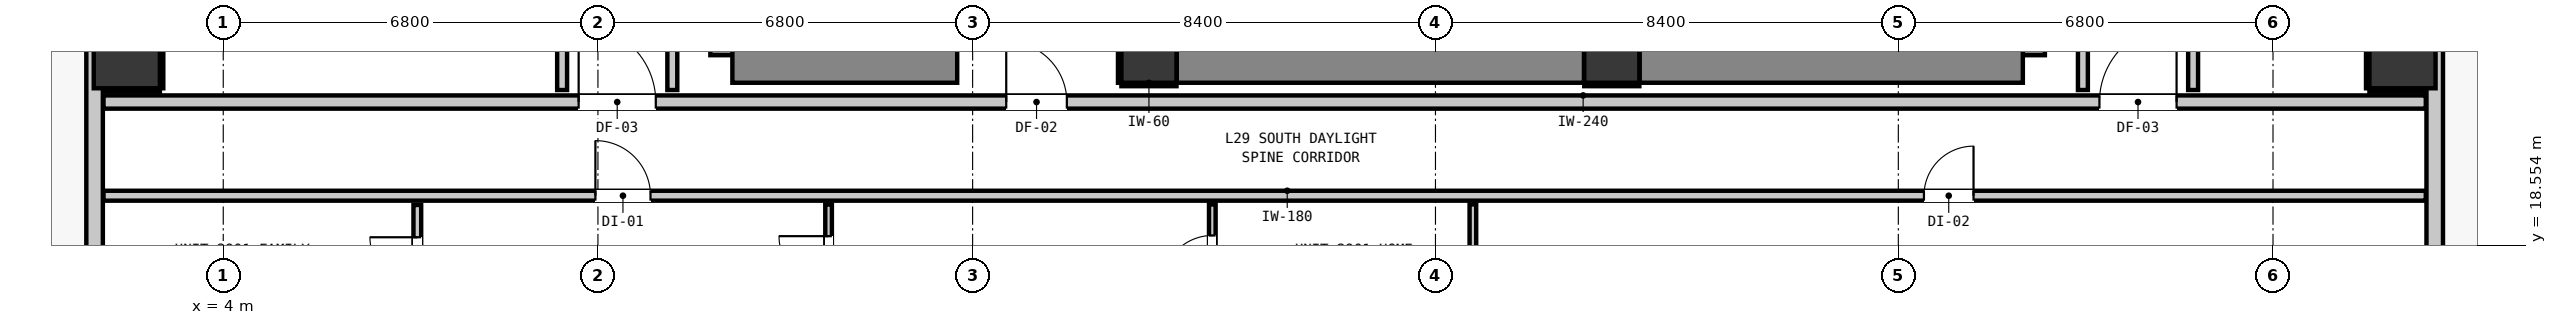
"""IFC4 building model, lengths in metres.
Left out: names, types, materials, properties, quantities, classifications, styles, units other than length and angle.
Written with IfcOpenShell. Run it as: python <this file> out.ifc"""

import sys

from ifc_helpers import new_model, si_unit, direction, frame, frame_2d, origin, origin_2d, place, context, subcontext, project, spatial, rectangle, extrude, element, fill, save


model = new_model("IFC4")
c1 = context("Model", 3, precision=1e-05, world=origin(), true_north=direction((0.0, 1.0)))
c2 = subcontext(c1, "Body", "Model", "MODEL_VIEW")
j1 = project(units=[si_unit("LENGTHUNIT", "METRE"), si_unit("PLANEANGLEUNIT", "RADIAN")], contexts=[c1])
p1 = place(None, origin())
s1 = spatial("IfcSite", under=j1, at=p1, CompositionType="ELEMENT")
p2 = place(p1, origin())
s2 = spatial("IfcBuilding", under=s1, at=p2, CompositionType="ELEMENT")
p3 = place(p2, frame((0.0, 0.0, 102.76)))
s3 = spatial("IfcBuildingStorey", under=s2, at=p3, CompositionType="ELEMENT", Elevation=102.76)
for number, where, z_axis, x_axis in (
    (1, (20.8, 22.0, 0.0), (0.0, 0.0, 1.0), (1.0, 0.0, 0.0)),
    (2, (29.2, 22.0, 0.0), (0.0, 0.0, 1.0), (1.0, 0.0, 0.0)),
):
    element("IfcColumn", number, at=place(p3, frame(where, z_axis=z_axis, x_axis=x_axis)), inside=s3, PredefinedType="COLUMN", context=c2, shape_type="SweptSolid", body=[
        extrude(rectangle(XDim=1.0, YDim=1.0, at=origin_2d()), origin(), (0.0, 0.0, 1.0), 3.32),
    ])
p4 = place(p3, frame((13.34, 22.0, 0.0), z_axis=(0.0, 0.0, 1.0), x_axis=(0.0, 1.0, 0.0)))
e3 = element("IfcWall", 3, at=p4, inside=s3, PredefinedType="SHEAR", context=c2, shape_type="SweptSolid", body=[
    extrude(rectangle(XDim=8.195, YDim=1.0, at=frame_2d((4.098, 0.0))), origin(), (0.0, 0.0, 1.0), 3.32),
])
p5 = place(p3, frame((13.24, 22.0, 0.0), z_axis=(0.0, 0.0, 1.0), x_axis=(1.0, 0.0, 0.0)))
e4 = element("IfcWall", 4, at=p5, inside=s3, PredefinedType="SHEAR", context=c2, shape_type="SweptSolid", body=[
    extrude(rectangle(XDim=4.08, YDim=1.0, at=frame_2d((2.04, 0.0))), origin(), (0.0, 0.0, 1.0), 3.32),
])
p6 = place(p3, frame((36.56, 22.0, 0.0), z_axis=(0.0, 0.0, 1.0), x_axis=(0.0, 1.0, 0.0)))
e5 = element("IfcWall", 5, at=p6, inside=s3, PredefinedType="SHEAR", context=c2, shape_type="SweptSolid", body=[
    extrude(rectangle(XDim=8.195, YDim=1.0, at=frame_2d((4.098, 0.0))), origin(), (0.0, 0.0, 1.0), 3.32),
])
p7 = place(p3, frame((29.705, 22.0, 0.0), z_axis=(0.0, 0.0, 1.0), x_axis=(1.0, 0.0, 0.0)))
e6 = element("IfcWall", 6, at=p7, inside=s3, PredefinedType="SHEAR", context=c2, shape_type="SweptSolid", body=[
    extrude(rectangle(XDim=6.955, YDim=1.0, at=frame_2d((3.478, 0.0))), origin(), (0.0, 0.0, 1.0), 3.32),
])
p8 = place(p3, frame((21.305, 22.0, 0.0), z_axis=(0.0, 0.0, 1.0), x_axis=(1.0, 0.0, 0.0)))
e7 = element("IfcWall", 7, at=p8, inside=s3, PredefinedType="SHEAR", context=c2, shape_type="SweptSolid", body=[
    extrude(rectangle(XDim=7.39, YDim=1.0, at=frame_2d((3.695, 0.0))), origin(), (0.0, 0.0, 1.0), 3.32),
])
for number, where, z_axis, x_axis in (
    (8, (2.25, 22.0, 0.0), (0.0, 0.0, 1.0), (1.0, 0.0, 0.0)),
    (9, (43.55, 22.0, 0.0), (0.0, 0.0, 1.0), (1.0, 0.0, 0.0)),
):
    element("IfcColumn", number, at=place(p3, frame(where, z_axis=z_axis, x_axis=x_axis)), inside=s3, PredefinedType="COLUMN", context=c2, shape_type="SweptSolid", body=[
        extrude(rectangle(XDim=1.2, YDim=1.2, at=origin_2d()), origin(), (0.0, 0.0, 1.0), 2.9),
    ])
p9 = place(p3, frame((1.665, 16.365, 0.0), z_axis=(0.0, 0.0, 1.0), x_axis=(0.0, 1.0, 0.0)))
e10 = element("IfcWall", 10, at=p9, inside=s3, PredefinedType="STANDARD", context=c2, shape_type="SweptSolid", body=[
    extrude(rectangle(XDim=34.67, YDim=0.3, at=frame_2d((17.335, 0.0))), origin(), (0.0, 0.0, 1.0), 2.9),
])
p10 = place(p9, frame((8.955, 0.0, 0.0)))
e11 = element("IfcOpeningElement", 11, at=p10, cuts=e10, PredefinedType="OPENING", context=c2, shape_type="SweptSolid", body=[
    extrude(rectangle(XDim=1.0, YDim=2.15, at=frame_2d((0.5, 1.075))), frame((0.0, 0.16, 0.0), z_axis=(0.0, -1.0, 0.0), x_axis=(1.0, 0.0, 0.0)), (0.0, 0.0, 1.0), 0.32),
])
p11 = place(p9, frame((30.958, 0.0, 0.85)))
e12 = element("IfcOpeningElement", 12, at=p11, cuts=e10, PredefinedType="OPENING", context=c2, shape_type="SweptSolid", body=[
    extrude(rectangle(XDim=1.05, YDim=1.65, at=frame_2d((0.525, 0.825))), frame((0.0, 0.16, 0.0), z_axis=(0.0, -1.0, 0.0), x_axis=(1.0, 0.0, 0.0)), (0.0, 0.0, 1.0), 0.32),
])
p12 = place(p9, frame((10.88, 0.0, 0.85)))
e13 = element("IfcOpeningElement", 13, at=p12, cuts=e10, PredefinedType="OPENING", context=c2, shape_type="SweptSolid", body=[
    extrude(rectangle(XDim=1.05, YDim=1.65, at=frame_2d((0.525, 0.825))), frame((0.0, 0.16, 0.0), z_axis=(0.0, -1.0, 0.0), x_axis=(1.0, 0.0, 0.0)), (0.0, 0.0, 1.0), 0.32),
])
p13 = place(p9, frame((15.41, 0.0, 0.85)))
e14 = element("IfcOpeningElement", 14, at=p13, cuts=e10, PredefinedType="OPENING", context=c2, shape_type="SweptSolid", body=[
    extrude(rectangle(XDim=1.05, YDim=1.65, at=frame_2d((0.525, 0.825))), frame((0.0, 0.16, 0.0), z_axis=(0.0, -1.0, 0.0), x_axis=(1.0, 0.0, 0.0)), (0.0, 0.0, 1.0), 0.32),
])
p14 = place(p3, frame((44.135, 51.035, 0.0), z_axis=(0.0, 0.0, 1.0), x_axis=(0.0, -1.0, 0.0)))
e15 = element("IfcWall", 15, at=p14, inside=s3, PredefinedType="STANDARD", context=c2, shape_type="SweptSolid", body=[
    extrude(rectangle(XDim=34.67, YDim=0.3, at=frame_2d((17.335, 0.0))), origin(), (0.0, 0.0, 1.0), 2.9),
])
p15 = place(p14, frame((0.901, 0.0, 0.0)))
e16 = element("IfcOpeningElement", 16, at=p15, cuts=e15, PredefinedType="OPENING", context=c2, shape_type="SweptSolid", body=[
    extrude(rectangle(XDim=1.0, YDim=2.15, at=frame_2d((0.5, 1.075))), frame((0.0, 0.16, 0.0), z_axis=(0.0, -1.0, 0.0), x_axis=(1.0, 0.0, 0.0)), (0.0, 0.0, 1.0), 0.32),
])
p16 = place(p14, frame((32.608, 0.0, 0.85)))
e17 = element("IfcOpeningElement", 17, at=p16, cuts=e15, PredefinedType="OPENING", context=c2, shape_type="SweptSolid", body=[
    extrude(rectangle(XDim=1.05, YDim=1.65, at=frame_2d((0.525, 0.825))), frame((0.0, 0.16, 0.0), z_axis=(0.0, -1.0, 0.0), x_axis=(1.0, 0.0, 0.0)), (0.0, 0.0, 1.0), 0.32),
])
p17 = place(p14, frame((23.248, 0.0, 0.85)))
e18 = element("IfcOpeningElement", 18, at=p17, cuts=e15, PredefinedType="OPENING", context=c2, shape_type="SweptSolid", body=[
    extrude(rectangle(XDim=1.05, YDim=1.65, at=frame_2d((0.525, 0.825))), frame((0.0, 0.16, 0.0), z_axis=(0.0, -1.0, 0.0), x_axis=(1.0, 0.0, 0.0)), (0.0, 0.0, 1.0), 0.32),
])
p18 = place(p3, frame((1.827, 21.15, 0.0), z_axis=(0.0, 0.0, 1.0), x_axis=(1.0, 0.0, 0.0)))
e19 = element("IfcWall", 19, at=p18, inside=s3, PredefinedType="PARTITIONING", context=c2, shape_type="SweptSolid", body=[
    extrude(rectangle(XDim=42.146, YDim=0.24, at=frame_2d((21.073, 0.0))), origin(), (0.0, 0.0, 1.0), 2.9),
])
p19 = place(p18, frame((16.383, 0.0, 0.0)))
e20 = element("IfcOpeningElement", 20, at=p19, cuts=e19, PredefinedType="OPENING", context=c2, shape_type="SweptSolid", body=[
    extrude(rectangle(XDim=1.1, YDim=2.15, at=frame_2d((0.55, 1.075))), frame((0.0, 0.13, 0.0), z_axis=(0.0, -1.0, 0.0), x_axis=(1.0, 0.0, 0.0)), (0.0, 0.0, 1.0), 0.26),
])
p20 = place(p18, frame((8.623, 0.0, 0.0)))
e21 = element("IfcOpeningElement", 21, at=p20, cuts=e19, PredefinedType="OPENING", context=c2, shape_type="SweptSolid", body=[
    extrude(rectangle(XDim=1.4, YDim=2.15, at=frame_2d((0.7, 1.075))), frame((0.0, 0.13, 0.0), z_axis=(0.0, -1.0, 0.0), x_axis=(1.0, 0.0, 0.0)), (0.0, 0.0, 1.0), 0.26),
])
p21 = place(p18, frame((36.223, 0.0, 0.0)))
e22 = element("IfcOpeningElement", 22, at=p21, cuts=e19, PredefinedType="OPENING", context=c2, shape_type="SweptSolid", body=[
    extrude(rectangle(XDim=1.4, YDim=2.15, at=frame_2d((0.7, 1.075))), frame((0.0, 0.13, 0.0), z_axis=(0.0, -1.0, 0.0), x_axis=(1.0, 0.0, 0.0)), (0.0, 0.0, 1.0), 0.26),
])
p22 = place(p3, frame((1.827, 19.45, 0.0), z_axis=(0.0, 0.0, 1.0), x_axis=(1.0, 0.0, 0.0)))
e23 = element("IfcWall", 23, at=p22, inside=s3, PredefinedType="PARTITIONING", context=c2, shape_type="SweptSolid", body=[
    extrude(rectangle(XDim=42.146, YDim=0.18, at=frame_2d((21.073, 0.0))), origin(), (0.0, 0.0, 1.0), 2.9),
])
p23 = place(p22, frame((8.927, 0.0, 0.0)))
e24 = element("IfcOpeningElement", 24, at=p23, cuts=e23, PredefinedType="OPENING", context=c2, shape_type="SweptSolid", body=[
    extrude(rectangle(XDim=1.0, YDim=2.15, at=frame_2d((0.5, 1.075))), frame((0.0, 0.1, 0.0), z_axis=(0.0, -1.0, 0.0), x_axis=(1.0, 0.0, 0.0)), (0.0, 0.0, 1.0), 0.2),
])
p24 = place(p22, frame((33.038, 0.0, 0.0)))
e25 = element("IfcOpeningElement", 25, at=p24, cuts=e23, PredefinedType="OPENING", context=c2, shape_type="SweptSolid", body=[
    extrude(rectangle(XDim=0.9, YDim=2.1, at=frame_2d((0.45, 1.05))), frame((0.0, 0.1, 0.0), z_axis=(0.0, -1.0, 0.0), x_axis=(1.0, 0.0, 0.0)), (0.0, 0.0, 1.0), 0.2),
])
p25 = place(p3, frame((10.15, 21.368, 0.0), z_axis=(0.0, 0.0, 1.0), x_axis=(0.0, 1.0, 0.0)))
e26 = element("IfcWall", 26, at=p25, inside=s3, PredefinedType="PARTITIONING", context=c2, shape_type="SweptSolid", body=[
    extrude(rectangle(XDim=3.109, YDim=0.18, at=frame_2d((1.555, 0.0))), origin(), (0.0, 0.0, 1.0), 2.9),
])
for number, where, z_axis, x_axis in (
    (27, (12.15, 21.368, 0.0), (0.0, 0.0, 1.0), (0.0, 1.0, 0.0)),
    (28, (37.75, 21.368, 0.0), (0.0, 0.0, 1.0), (0.0, 1.0, 0.0)),
):
    element("IfcWall", number, at=place(p3, frame(where, z_axis=z_axis, x_axis=x_axis)), inside=s3, PredefinedType="PARTITIONING", context=c2, shape_type="SweptSolid", body=[
        extrude(rectangle(XDim=18.694, YDim=0.18, at=frame_2d((9.347, 0.0))), origin(), (0.0, 0.0, 1.0), 2.9),
    ])
p26 = place(p3, frame((39.75, 21.368, 0.0), z_axis=(0.0, 0.0, 1.0), x_axis=(0.0, 1.0, 0.0)))
e29 = element("IfcWall", 29, at=p26, inside=s3, PredefinedType="PARTITIONING", context=c2, shape_type="SweptSolid", body=[
    extrude(rectangle(XDim=3.109, YDim=0.18, at=frame_2d((1.555, 0.0))), origin(), (0.0, 0.0, 1.0), 2.9),
])
p27 = place(p3, frame((7.522, 17.255, 0.0), z_axis=(0.0, 0.0, 1.0), x_axis=(0.0, 1.0, 0.0)))
e30 = element("IfcWall", 30, at=p27, inside=s3, PredefinedType="PARTITIONING", context=c2, shape_type="SweptSolid", body=[
    extrude(rectangle(XDim=2.027, YDim=0.14, at=frame_2d((1.014, 0.0))), origin(), (0.0, 0.0, 1.0), 2.9),
])
p28 = place(p27, frame((0.581, 0.0, 0.0)))
e31 = element("IfcOpeningElement", 31, at=p28, cuts=e30, PredefinedType="OPENING", context=c2, shape_type="SweptSolid", body=[
    extrude(rectangle(XDim=0.86, YDim=2.02, at=frame_2d((0.43, 1.01))), frame((0.0, 0.08, 0.0), z_axis=(0.0, -1.0, 0.0), x_axis=(1.0, 0.0, 0.0)), (0.0, 0.0, 1.0), 0.16),
])
p29 = place(p3, frame((14.986, 17.245, 0.0), z_axis=(0.0, 0.0, 1.0), x_axis=(0.0, 1.0, 0.0)))
e32 = element("IfcWall", 32, at=p29, inside=s3, PredefinedType="PARTITIONING", context=c2, shape_type="SweptSolid", body=[
    extrude(rectangle(XDim=2.047, YDim=0.12, at=frame_2d((1.023, 0.0))), origin(), (0.0, 0.0, 1.0), 2.9),
])
p30 = place(p29, frame((0.571, 0.0, 0.0)))
e33 = element("IfcOpeningElement", 33, at=p30, cuts=e32, PredefinedType="OPENING", context=c2, shape_type="SweptSolid", body=[
    extrude(rectangle(XDim=0.9, YDim=2.1, at=frame_2d((0.45, 1.05))), frame((0.0, 0.07, 0.0), z_axis=(0.0, -1.0, 0.0), x_axis=(1.0, 0.0, 0.0)), (0.0, 0.0, 1.0), 0.14),
])
p31 = place(p3, frame((21.95, 17.245, 0.0), z_axis=(0.0, 0.0, 1.0), x_axis=(0.0, 1.0, 0.0)))
e34 = element("IfcWall", 34, at=p31, inside=s3, PredefinedType="PARTITIONING", context=c2, shape_type="SweptSolid", body=[
    extrude(rectangle(XDim=2.047, YDim=0.12, at=frame_2d((1.023, 0.0))), origin(), (0.0, 0.0, 1.0), 2.9),
])
p32 = place(p31, frame((0.583, 0.0, 0.0)))
e35 = element("IfcOpeningElement", 35, at=p32, cuts=e34, PredefinedType="OPENING", context=c2, shape_type="SweptSolid", body=[
    extrude(rectangle(XDim=0.9, YDim=2.1, at=frame_2d((0.45, 1.05))), frame((0.0, 0.07, 0.0), z_axis=(0.0, -1.0, 0.0), x_axis=(1.0, 0.0, 0.0)), (0.0, 0.0, 1.0), 0.14),
])
p33 = place(p3, frame((26.679, 17.245, 0.0), z_axis=(0.0, 0.0, 1.0), x_axis=(0.0, 1.0, 0.0)))
e36 = element("IfcWall", 36, at=p33, inside=s3, PredefinedType="PARTITIONING", context=c2, shape_type="SweptSolid", body=[
    extrude(rectangle(XDim=2.047, YDim=0.12, at=frame_2d((1.023, 0.0))), origin(), (0.0, 0.0, 1.0), 2.9),
])
for number, where, z_axis, x_axis in (
    (37, (20.3, 21.468, 0.0), (0.0, 0.0, 1.0), (1.0, 0.0, 0.0)),
    (38, (20.268, 21.5, 0.0), (0.0, 0.0, 1.0), (0.0, 1.0, 0.0)),
    (39, (28.7, 21.468, 0.0), (0.0, 0.0, 1.0), (1.0, 0.0, 0.0)),
):
    element("IfcWall", number, at=place(p3, frame(where, z_axis=z_axis, x_axis=x_axis)), inside=s3, PredefinedType="PARTITIONING", context=c2, shape_type="SweptSolid", body=[
        extrude(rectangle(XDim=1.0, YDim=0.06, at=frame_2d((0.5, 0.0))), origin(), (0.0, 0.0, 1.0), 0.905),
    ])
p34 = place(p3, frame((1.83, 21.368, 0.0), z_axis=(0.0, 0.0, 1.0), x_axis=(1.0, 0.0, 0.0)))
e40 = element("IfcWall", 40, at=p34, inside=s3, PredefinedType="PARTITIONING", context=c2, shape_type="SweptSolid", body=[
    extrude(rectangle(XDim=1.02, YDim=0.06, at=frame_2d((0.51, 0.0))), origin(), (0.0, 0.0, 1.0), 0.905),
])
p35 = place(p3, frame((2.882, 21.4, 0.0), z_axis=(0.0, 0.0, 1.0), x_axis=(0.0, 1.0, 0.0)))
e41 = element("IfcWall", 41, at=p35, inside=s3, PredefinedType="PARTITIONING", context=c2, shape_type="SweptSolid", body=[
    extrude(rectangle(XDim=1.2, YDim=0.06, at=frame_2d((0.6, 0.0))), origin(), (0.0, 0.0, 1.0), 1.45),
])
p36 = place(p3, frame((42.95, 21.368, 0.0), z_axis=(0.0, 0.0, 1.0), x_axis=(1.0, 0.0, 0.0)))
e42 = element("IfcWall", 42, at=p36, inside=s3, PredefinedType="PARTITIONING", context=c2, shape_type="SweptSolid", body=[
    extrude(rectangle(XDim=1.02, YDim=0.06, at=frame_2d((0.51, 0.0))), origin(), (0.0, 0.0, 1.0), 0.905),
])
p37 = place(p3, frame((42.918, 21.4, 0.0), z_axis=(0.0, 0.0, 1.0), x_axis=(0.0, 1.0, 0.0)))
e43 = element("IfcWall", 43, at=p37, inside=s3, PredefinedType="PARTITIONING", context=c2, shape_type="SweptSolid", body=[
    extrude(rectangle(XDim=1.2, YDim=0.06, at=frame_2d((0.6, 0.0))), origin(), (0.0, 0.0, 1.0), 1.45),
])
p38 = place(p19, origin())
e44 = element("IfcDoor", 44, at=p38, inside=s3, OperationType="SINGLE_SWING_LEFT", PredefinedType="DOOR", context=c2, shape_type="SweptSolid", body=[
    extrude(rectangle(XDim=1.1, YDim=2.15, at=frame_2d((0.55, 1.075))), frame((0.0, 0.025, 0.0), z_axis=(0.0, -1.0, 0.0), x_axis=(1.0, 0.0, 0.0)), (0.0, 0.0, 1.0), 0.05),
])
fill(e20, e44)
p39 = place(p20, origin())
e45 = element("IfcDoor", 45, at=p39, inside=s3, OperationType="SINGLE_SWING_LEFT", PredefinedType="DOOR", context=c2, shape_type="SweptSolid", body=[
    extrude(rectangle(XDim=1.4, YDim=2.15, at=frame_2d((0.7, 1.075))), frame((0.0, 0.025, 0.0), z_axis=(0.0, -1.0, 0.0), x_axis=(1.0, 0.0, 0.0)), (0.0, 0.0, 1.0), 0.05),
])
fill(e21, e45)
p40 = place(p21, origin())
e46 = element("IfcDoor", 46, at=p40, inside=s3, OperationType="SINGLE_SWING_RIGHT", PredefinedType="DOOR", context=c2, shape_type="SweptSolid", body=[
    extrude(rectangle(XDim=1.4, YDim=2.15, at=frame_2d((0.7, 1.075))), frame((0.0, 0.025, 0.0), z_axis=(0.0, -1.0, 0.0), x_axis=(1.0, 0.0, 0.0)), (0.0, 0.0, 1.0), 0.05),
])
fill(e22, e46)
p41 = place(p23, origin())
e47 = element("IfcDoor", 47, at=p41, inside=s3, OperationType="SINGLE_SWING_LEFT", PredefinedType="DOOR", context=c2, shape_type="SweptSolid", body=[
    extrude(rectangle(XDim=1.0, YDim=2.15, at=frame_2d((0.5, 1.075))), frame((0.0, 0.025, 0.0), z_axis=(0.0, -1.0, 0.0), x_axis=(1.0, 0.0, 0.0)), (0.0, 0.0, 1.0), 0.05),
])
fill(e24, e47)
p42 = place(p28, origin())
e48 = element("IfcDoor", 48, at=p42, inside=s3, OperationType="SINGLE_SWING_RIGHT", PredefinedType="DOOR", context=c2, shape_type="SweptSolid", body=[
    extrude(rectangle(XDim=0.86, YDim=2.02, at=frame_2d((0.43, 1.01))), frame((0.0, 0.025, 0.0), z_axis=(0.0, -1.0, 0.0), x_axis=(1.0, 0.0, 0.0)), (0.0, 0.0, 1.0), 0.05),
])
fill(e31, e48)
p43 = place(p30, origin())
e49 = element("IfcDoor", 49, at=p43, inside=s3, OperationType="SINGLE_SWING_RIGHT", PredefinedType="DOOR", context=c2, shape_type="SweptSolid", body=[
    extrude(rectangle(XDim=0.9, YDim=2.1, at=frame_2d((0.45, 1.05))), frame((0.0, 0.025, 0.0), z_axis=(0.0, -1.0, 0.0), x_axis=(1.0, 0.0, 0.0)), (0.0, 0.0, 1.0), 0.05),
])
fill(e33, e49)
p44 = place(p32, origin())
e50 = element("IfcDoor", 50, at=p44, inside=s3, OperationType="SINGLE_SWING_LEFT", PredefinedType="DOOR", context=c2, shape_type="SweptSolid", body=[
    extrude(rectangle(XDim=0.9, YDim=2.1, at=frame_2d((0.45, 1.05))), frame((0.0, 0.025, 0.0), z_axis=(0.0, -1.0, 0.0), x_axis=(1.0, 0.0, 0.0)), (0.0, 0.0, 1.0), 0.05),
])
fill(e35, e50)
p45 = place(p24, origin())
e51 = element("IfcDoor", 51, at=p45, inside=s3, OperationType="SINGLE_SWING_RIGHT", PredefinedType="DOOR", context=c2, shape_type="SweptSolid", body=[
    extrude(rectangle(XDim=0.9, YDim=2.1, at=frame_2d((0.45, 1.05))), frame((0.0, 0.025, 0.0), z_axis=(0.0, -1.0, 0.0), x_axis=(1.0, 0.0, 0.0)), (0.0, 0.0, 1.0), 0.05),
])
fill(e25, e51)
save(model, sys.argv[1])
